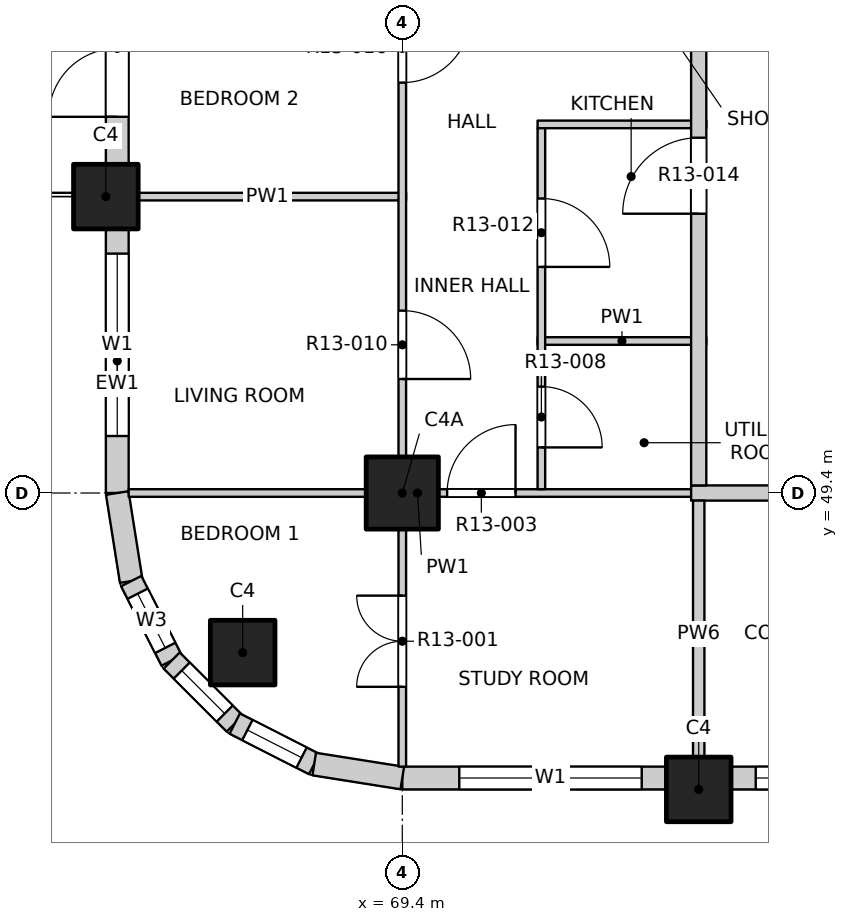
"""IFC4 building model, lengths in metres.
Left out: names, types, materials, properties, quantities, classifications, styles, units other than length and angle.
Written with IfcOpenShell. Run it as: python <this file> out.ifc"""

import sys

from ifc_helpers import new_model, si_unit, direction, frame, frame_2d, origin, origin_2d, place, context, subcontext, project, spatial, rectangle, extrude, element, fill, save


model = new_model("IFC4")
c1 = context("Model", 3, precision=1e-05, world=origin(), true_north=direction((0.0, 1.0)))
c2 = subcontext(c1, "Body", "Model", "MODEL_VIEW")
j1 = project(units=[si_unit("LENGTHUNIT", "METRE"), si_unit("PLANEANGLEUNIT", "RADIAN")], contexts=[c1])
p1 = place(None, origin())
s1 = spatial("IfcSite", under=j1, at=p1, CompositionType="ELEMENT")
p2 = place(p1, origin())
s2 = spatial("IfcBuilding", under=s1, at=p2, CompositionType="ELEMENT")
p3 = place(p2, frame((0.0, 0.0, 140.7)))
s3 = spatial("IfcBuildingStorey", under=s2, at=p3, CompositionType="ELEMENT", Elevation=140.7)
for number, where, z_axis, x_axis in (
    (1, (67.3, 47.3, -0.25), (0.0, 0.0, 1.0), (1.0, 0.0, 0.0)),
    (2, (65.5, 53.3, -0.25), (0.0, 0.0, 1.0), (1.0, 0.0, 0.0)),
    (3, (73.3, 45.5, -0.25), (0.0, 0.0, 1.0), (1.0, 0.0, 0.0)),
):
    element("IfcColumn", number, at=place(p3, frame(where, z_axis=z_axis, x_axis=x_axis)), inside=s3, PredefinedType="COLUMN", context=c2, shape_type="SweptSolid", body=[
        extrude(rectangle(XDim=0.85, YDim=0.85, at=origin_2d()), origin(), (0.0, 0.0, 1.0), 3.35),
    ])
p4 = place(p3, frame((69.4, 49.4, -0.25), z_axis=(0.0, 0.0, 1.0), x_axis=(1.0, 0.0, 0.0)))
e4 = element("IfcColumn", 4, at=p4, inside=s3, PredefinedType="COLUMN", context=c2, shape_type="SweptSolid", body=[
    extrude(rectangle(XDim=0.95, YDim=0.95, at=origin_2d()), origin(), (0.0, 0.0, 1.0), 3.35),
])
p5 = place(p3, frame((69.4, 45.65, 0.0), z_axis=(0.0, 0.0, 1.0), x_axis=(1.0, 0.0, 0.0)))
e5 = element("IfcWall", 5, at=p5, inside=s3, PredefinedType="SOLIDWALL", context=c2, shape_type="SweptSolid", body=[
    extrude(rectangle(XDim=3.475, YDim=0.3, at=frame_2d((1.738, 0.0))), origin(), (0.0, 0.0, 1.0), 3.1),
])
p6 = place(p5, frame((0.75, 0.0, 0.9)))
e6 = element("IfcOpeningElement", 6, at=p6, cuts=e5, PredefinedType="OPENING", context=c2, shape_type="SweptSolid", body=[
    extrude(rectangle(XDim=2.4, YDim=1.8, at=frame_2d((1.2, 0.9))), frame((0.0, 0.16, 0.0), z_axis=(0.0, -1.0, 0.0), x_axis=(1.0, 0.0, 0.0)), (0.0, 0.0, 1.0), 0.32),
])
p7 = place(p3, frame((73.725, 45.65, 0.0), z_axis=(0.0, 0.0, 1.0), x_axis=(1.0, 0.0, 0.0)))
e7 = element("IfcWall", 7, at=p7, inside=s3, PredefinedType="SOLIDWALL", context=c2, shape_type="SweptSolid", body=[
    extrude(rectangle(XDim=6.95, YDim=0.3, at=frame_2d((3.475, 0.0))), origin(), (0.0, 0.0, 1.0), 3.1),
])
p8 = place(p7, frame((0.325, 0.0, 0.9)))
e8 = element("IfcOpeningElement", 8, at=p8, cuts=e7, PredefinedType="OPENING", context=c2, shape_type="SweptSolid", body=[
    extrude(rectangle(XDim=2.4, YDim=1.8, at=frame_2d((1.2, 0.9))), frame((0.0, 0.16, 0.0), z_axis=(0.0, -1.0, 0.0), x_axis=(1.0, 0.0, 0.0)), (0.0, 0.0, 1.0), 0.32),
])
p9 = place(p7, frame((4.225, 0.0, 0.9)))
e9 = element("IfcOpeningElement", 9, at=p9, cuts=e7, PredefinedType="OPENING", context=c2, shape_type="SweptSolid", body=[
    extrude(rectangle(XDim=2.4, YDim=1.8, at=frame_2d((1.2, 0.9))), frame((0.0, 0.16, 0.0), z_axis=(0.0, -1.0, 0.0), x_axis=(1.0, 0.0, 0.0)), (0.0, 0.0, 1.0), 0.32),
])
p10 = place(p3, frame((65.65, 49.4, 0.0), z_axis=(0.0, 0.0, 1.0), x_axis=(0.0, 1.0, 0.0)))
e10 = element("IfcWall", 10, at=p10, inside=s3, PredefinedType="SOLIDWALL", context=c2, shape_type="SweptSolid", body=[
    extrude(rectangle(XDim=3.475, YDim=0.3, at=frame_2d((1.738, 0.0))), origin(), (0.0, 0.0, 1.0), 3.1),
])
p11 = place(p10, frame((0.75, 0.0, 0.9)))
e11 = element("IfcOpeningElement", 11, at=p11, cuts=e10, PredefinedType="OPENING", context=c2, shape_type="SweptSolid", body=[
    extrude(rectangle(XDim=2.4, YDim=1.8, at=frame_2d((1.2, 0.9))), frame((0.0, 0.16, 0.0), z_axis=(0.0, -1.0, 0.0), x_axis=(1.0, 0.0, 0.0)), (0.0, 0.0, 1.0), 0.32),
])
p12 = place(p3, frame((65.65, 53.725, 0.0), z_axis=(0.0, 0.0, 1.0), x_axis=(0.0, 1.0, 0.0)))
e12 = element("IfcWall", 12, at=p12, inside=s3, PredefinedType="SOLIDWALL", context=c2, shape_type="SweptSolid", body=[
    extrude(rectangle(XDim=6.95, YDim=0.3, at=frame_2d((3.475, 0.0))), origin(), (0.0, 0.0, 1.0), 3.1),
])
p13 = place(p12, frame((0.625, 0.0, 0.0)))
e13 = element("IfcOpeningElement", 13, at=p13, cuts=e12, PredefinedType="OPENING", context=c2, shape_type="SweptSolid", body=[
    extrude(rectangle(XDim=1.8, YDim=2.4, at=frame_2d((0.9, 1.2))), frame((0.0, 0.16, 0.0), z_axis=(0.0, -1.0, 0.0), x_axis=(1.0, 0.0, 0.0)), (0.0, 0.0, 1.0), 0.32),
])
p14 = place(p12, frame((4.225, 0.0, 0.9)))
e14 = element("IfcOpeningElement", 14, at=p14, cuts=e12, PredefinedType="OPENING", context=c2, shape_type="SweptSolid", body=[
    extrude(rectangle(XDim=2.4, YDim=1.8, at=frame_2d((1.2, 0.9))), frame((0.0, 0.16, 0.0), z_axis=(0.0, -1.0, 0.0), x_axis=(1.0, 0.0, 0.0)), (0.0, 0.0, 1.0), 0.32),
])
p15 = place(p3, frame((65.65, 49.4, 0.0), z_axis=(0.0, 0.0, 1.0), x_axis=(0.156496880861, -0.987678452879, 0.0)))
e15 = element("IfcWall", 15, at=p15, inside=s3, PredefinedType="SOLIDWALL", context=c2, shape_type="SweptSolid", body=[
    extrude(rectangle(XDim=1.173, YDim=0.3, at=frame_2d((0.586, 0.0))), origin(), (0.0, 0.0, 1.0), 3.1),
])
p16 = place(p3, frame((65.833, 48.241, 0.0), z_axis=(0.0, 0.0, 1.0), x_axis=(0.454025524128, -0.890988677504, 0.0)))
e16 = element("IfcWall", 16, at=p16, inside=s3, PredefinedType="SOLIDWALL", context=c2, shape_type="SweptSolid", body=[
    extrude(rectangle(XDim=1.173, YDim=0.3, at=frame_2d((0.587, 0.0))), origin(), (0.0, 0.0, 1.0), 3.1),
])
p17 = place(p16, frame((0.187, 0.0, 0.9)))
e17 = element("IfcOpeningElement", 17, at=p17, cuts=e16, PredefinedType="OPENING", context=c2, shape_type="SweptSolid", body=[
    extrude(rectangle(XDim=0.8, YDim=1.2, at=frame_2d((0.4, 0.6))), frame((0.0, 0.16, 0.0), z_axis=(0.0, -1.0, 0.0), x_axis=(1.0, 0.0, 0.0)), (0.0, 0.0, 1.0), 0.32),
])
p18 = place(p3, frame((66.366, 47.196, 0.0), z_axis=(0.0, 0.0, 1.0), x_axis=(0.707106781187, -0.707106781187, 0.0)))
e18 = element("IfcWall", 18, at=p18, inside=s3, PredefinedType="SOLIDWALL", context=c2, shape_type="SweptSolid", body=[
    extrude(rectangle(XDim=1.173, YDim=0.3, at=frame_2d((0.586, 0.0))), origin(), (0.0, 0.0, 1.0), 3.1),
])
p19 = place(p18, frame((0.187, 0.0, 0.9)))
e19 = element("IfcOpeningElement", 19, at=p19, cuts=e18, PredefinedType="OPENING", context=c2, shape_type="SweptSolid", body=[
    extrude(rectangle(XDim=0.8, YDim=1.2, at=frame_2d((0.4, 0.6))), frame((0.0, 0.16, 0.0), z_axis=(0.0, -1.0, 0.0), x_axis=(1.0, 0.0, 0.0)), (0.0, 0.0, 1.0), 0.32),
])
p20 = place(p3, frame((67.196, 46.366, 0.0), z_axis=(0.0, 0.0, 1.0), x_axis=(0.890988677504, -0.454025524128, 0.0)))
e20 = element("IfcWall", 20, at=p20, inside=s3, PredefinedType="SOLIDWALL", context=c2, shape_type="SweptSolid", body=[
    extrude(rectangle(XDim=1.173, YDim=0.3, at=frame_2d((0.587, 0.0))), origin(), (0.0, 0.0, 1.0), 3.1),
])
p21 = place(p20, frame((0.187, 0.0, 0.9)))
e21 = element("IfcOpeningElement", 21, at=p21, cuts=e20, PredefinedType="OPENING", context=c2, shape_type="SweptSolid", body=[
    extrude(rectangle(XDim=0.8, YDim=1.2, at=frame_2d((0.4, 0.6))), frame((0.0, 0.16, 0.0), z_axis=(0.0, -1.0, 0.0), x_axis=(1.0, 0.0, 0.0)), (0.0, 0.0, 1.0), 0.32),
])
p22 = place(p3, frame((68.241, 45.833, 0.0), z_axis=(0.0, 0.0, 1.0), x_axis=(0.987678452879, -0.156496880861, 0.0)))
e22 = element("IfcWall", 22, at=p22, inside=s3, PredefinedType="SOLIDWALL", context=c2, shape_type="SweptSolid", body=[
    extrude(rectangle(XDim=1.173, YDim=0.3, at=frame_2d((0.586, 0.0))), origin(), (0.0, 0.0, 1.0), 3.1),
])
p23 = place(p3, frame((65.8, 49.4, 0.0), z_axis=(0.0, 0.0, 1.0), x_axis=(1.0, 0.0, 0.0)))
e23 = element("IfcWall", 23, at=p23, inside=s3, PredefinedType="PARTITIONING", context=c2, shape_type="SweptSolid", body=[
    extrude(rectangle(XDim=7.6, YDim=0.1, at=frame_2d((3.8, 0.0))), origin(), (0.0, 0.0, 1.0), 3.1),
])
p24 = place(p23, frame((4.19, 0.0, 0.0)))
e24 = element("IfcOpeningElement", 24, at=p24, cuts=e23, PredefinedType="OPENING", context=c2, shape_type="SweptSolid", body=[
    extrude(rectangle(XDim=0.9, YDim=2.1, at=frame_2d((0.45, 1.05))), frame((0.0, 0.06, 0.0), z_axis=(0.0, -1.0, 0.0), x_axis=(1.0, 0.0, 0.0)), (0.0, 0.0, 1.0), 0.12),
])
p25 = place(p3, frame((73.2, 49.4, 0.0), z_axis=(0.0, 0.0, 1.0), x_axis=(1.0, 0.0, 0.0)))
e25 = element("IfcWall", 25, at=p25, inside=s3, PredefinedType="PARTITIONING", context=c2, shape_type="SweptSolid", body=[
    extrude(rectangle(XDim=23.6, YDim=0.2, at=frame_2d((11.8, 0.0))), origin(), (0.0, 0.0, 1.0), 3.1),
])
p26 = place(p25, frame((2.225, 0.0, 0.0)))
e26 = element("IfcOpeningElement", 26, at=p26, cuts=e25, PredefinedType="OPENING", context=c2, shape_type="SweptSolid", body=[
    extrude(rectangle(XDim=1.2, YDim=2.1, at=frame_2d((0.6, 1.05))), frame((0.0, 0.11, 0.0), z_axis=(0.0, -1.0, 0.0), x_axis=(1.0, 0.0, 0.0)), (0.0, 0.0, 1.0), 0.22),
])
p27 = place(p25, frame((12.375, 0.0, 0.0)))
e27 = element("IfcOpeningElement", 27, at=p27, cuts=e25, PredefinedType="OPENING", context=c2, shape_type="SweptSolid", body=[
    extrude(rectangle(XDim=1.2, YDim=2.1, at=frame_2d((0.6, 1.05))), frame((0.0, 0.11, 0.0), z_axis=(0.0, -1.0, 0.0), x_axis=(1.0, 0.0, 0.0)), (0.0, 0.0, 1.0), 0.22),
])
p28 = place(p25, frame((20.175, 0.0, 0.0)))
e28 = element("IfcOpeningElement", 28, at=p28, cuts=e25, PredefinedType="OPENING", context=c2, shape_type="SweptSolid", body=[
    extrude(rectangle(XDim=1.2, YDim=2.1, at=frame_2d((0.6, 1.05))), frame((0.0, 0.11, 0.0), z_axis=(0.0, -1.0, 0.0), x_axis=(1.0, 0.0, 0.0)), (0.0, 0.0, 1.0), 0.22),
])
p29 = place(p3, frame((71.18, 51.4, 0.0), z_axis=(0.0, 0.0, 1.0), x_axis=(1.0, 0.0, 0.0)))
e29 = element("IfcWall", 29, at=p29, inside=s3, PredefinedType="PARTITIONING", context=c2, shape_type="SweptSolid", body=[
    extrude(rectangle(XDim=2.22, YDim=0.1, at=frame_2d((1.11, 0.0))), origin(), (0.0, 0.0, 1.0), 3.1),
])
p30 = place(p3, frame((65.8, 53.3, 0.0), z_axis=(0.0, 0.0, 1.0), x_axis=(1.0, 0.0, 0.0)))
e30 = element("IfcWall", 30, at=p30, inside=s3, PredefinedType="PARTITIONING", context=c2, shape_type="SweptSolid", body=[
    extrude(rectangle(XDim=3.65, YDim=0.1, at=frame_2d((1.825, 0.0))), origin(), (0.0, 0.0, 1.0), 3.1),
])
p31 = place(p3, frame((71.18, 54.25, 0.0), z_axis=(0.0, 0.0, 1.0), x_axis=(1.0, 0.0, 0.0)))
e31 = element("IfcWall", 31, at=p31, inside=s3, PredefinedType="PARTITIONING", context=c2, shape_type="SweptSolid", body=[
    extrude(rectangle(XDim=2.22, YDim=0.1, at=frame_2d((1.11, 0.0))), origin(), (0.0, 0.0, 1.0), 3.1),
])
p32 = place(p3, frame((69.4, 45.8, 0.0), z_axis=(0.0, 0.0, 1.0), x_axis=(0.0, 1.0, 0.0)))
e32 = element("IfcWall", 32, at=p32, inside=s3, PredefinedType="PARTITIONING", context=c2, shape_type="SweptSolid", body=[
    extrude(rectangle(XDim=38.4, YDim=0.1, at=frame_2d((19.2, 0.0))), origin(), (0.0, 0.0, 1.0), 3.1),
])
p33 = place(p32, frame((1.05, 0.0, 0.0)))
e33 = element("IfcOpeningElement", 33, at=p33, cuts=e32, PredefinedType="OPENING", context=c2, shape_type="SweptSolid", body=[
    extrude(rectangle(XDim=1.2, YDim=2.1, at=frame_2d((0.6, 1.05))), frame((0.0, 0.06, 0.0), z_axis=(0.0, -1.0, 0.0), x_axis=(1.0, 0.0, 0.0)), (0.0, 0.0, 1.0), 0.12),
])
p34 = place(p32, frame((5.1, 0.0, 0.0)))
e34 = element("IfcOpeningElement", 34, at=p34, cuts=e32, PredefinedType="OPENING", context=c2, shape_type="SweptSolid", body=[
    extrude(rectangle(XDim=0.9, YDim=2.1, at=frame_2d((0.45, 1.05))), frame((0.0, 0.06, 0.0), z_axis=(0.0, -1.0, 0.0), x_axis=(1.0, 0.0, 0.0)), (0.0, 0.0, 1.0), 0.12),
])
p35 = place(p32, frame((9.0, 0.0, 0.0)))
e35 = element("IfcOpeningElement", 35, at=p35, cuts=e32, PredefinedType="OPENING", context=c2, shape_type="SweptSolid", body=[
    extrude(rectangle(XDim=0.9, YDim=2.1, at=frame_2d((0.45, 1.05))), frame((0.0, 0.06, 0.0), z_axis=(0.0, -1.0, 0.0), x_axis=(1.0, 0.0, 0.0)), (0.0, 0.0, 1.0), 0.12),
])
p36 = place(p32, frame((12.9, 0.0, 0.0)))
e36 = element("IfcOpeningElement", 36, at=p36, cuts=e32, PredefinedType="OPENING", context=c2, shape_type="SweptSolid", body=[
    extrude(rectangle(XDim=0.9, YDim=2.1, at=frame_2d((0.45, 1.05))), frame((0.0, 0.06, 0.0), z_axis=(0.0, -1.0, 0.0), x_axis=(1.0, 0.0, 0.0)), (0.0, 0.0, 1.0), 0.12),
])
p37 = place(p32, frame((16.8, 0.0, 0.0)))
e37 = element("IfcOpeningElement", 37, at=p37, cuts=e32, PredefinedType="OPENING", context=c2, shape_type="SweptSolid", body=[
    extrude(rectangle(XDim=0.9, YDim=2.1, at=frame_2d((0.45, 1.05))), frame((0.0, 0.06, 0.0), z_axis=(0.0, -1.0, 0.0), x_axis=(1.0, 0.0, 0.0)), (0.0, 0.0, 1.0), 0.12),
])
p38 = place(p32, frame((20.7, 0.0, 0.0)))
e38 = element("IfcOpeningElement", 38, at=p38, cuts=e32, PredefinedType="OPENING", context=c2, shape_type="SweptSolid", body=[
    extrude(rectangle(XDim=0.9, YDim=2.1, at=frame_2d((0.45, 1.05))), frame((0.0, 0.06, 0.0), z_axis=(0.0, -1.0, 0.0), x_axis=(1.0, 0.0, 0.0)), (0.0, 0.0, 1.0), 0.12),
])
p39 = place(p32, frame((24.6, 0.0, 0.0)))
e39 = element("IfcOpeningElement", 39, at=p39, cuts=e32, PredefinedType="OPENING", context=c2, shape_type="SweptSolid", body=[
    extrude(rectangle(XDim=0.9, YDim=2.1, at=frame_2d((0.45, 1.05))), frame((0.0, 0.06, 0.0), z_axis=(0.0, -1.0, 0.0), x_axis=(1.0, 0.0, 0.0)), (0.0, 0.0, 1.0), 0.12),
])
p40 = place(p32, frame((30.3, 0.0, 0.0)))
e40 = element("IfcOpeningElement", 40, at=p40, cuts=e32, PredefinedType="OPENING", context=c2, shape_type="SweptSolid", body=[
    extrude(rectangle(XDim=1.2, YDim=2.1, at=frame_2d((0.6, 1.05))), frame((0.0, 0.06, 0.0), z_axis=(0.0, -1.0, 0.0), x_axis=(1.0, 0.0, 0.0)), (0.0, 0.0, 1.0), 0.12),
])
p41 = place(p32, frame((36.15, 0.0, 0.0)))
e41 = element("IfcOpeningElement", 41, at=p41, cuts=e32, PredefinedType="OPENING", context=c2, shape_type="SweptSolid", body=[
    extrude(rectangle(XDim=1.2, YDim=2.1, at=frame_2d((0.6, 1.05))), frame((0.0, 0.06, 0.0), z_axis=(0.0, -1.0, 0.0), x_axis=(1.0, 0.0, 0.0)), (0.0, 0.0, 1.0), 0.12),
])
p42 = place(p3, frame((71.23, 49.45, 0.0), z_axis=(0.0, 0.0, 1.0), x_axis=(0.0, 1.0, 0.0)))
e42 = element("IfcWall", 42, at=p42, inside=s3, PredefinedType="PARTITIONING", context=c2, shape_type="SweptSolid", body=[
    extrude(rectangle(XDim=4.75, YDim=0.1, at=frame_2d((2.375, 0.0))), origin(), (0.0, 0.0, 1.0), 3.1),
])
p43 = place(p42, frame((0.55, 0.0, 0.0)))
e43 = element("IfcOpeningElement", 43, at=p43, cuts=e42, PredefinedType="OPENING", context=c2, shape_type="SweptSolid", body=[
    extrude(rectangle(XDim=0.8, YDim=2.1, at=frame_2d((0.4, 1.05))), frame((0.0, 0.06, 0.0), z_axis=(0.0, -1.0, 0.0), x_axis=(1.0, 0.0, 0.0)), (0.0, 0.0, 1.0), 0.12),
])
p44 = place(p42, frame((2.925, 0.0, 0.0)))
e44 = element("IfcOpeningElement", 44, at=p44, cuts=e42, PredefinedType="OPENING", context=c2, shape_type="SweptSolid", body=[
    extrude(rectangle(XDim=0.9, YDim=2.1, at=frame_2d((0.45, 1.05))), frame((0.0, 0.06, 0.0), z_axis=(0.0, -1.0, 0.0), x_axis=(1.0, 0.0, 0.0)), (0.0, 0.0, 1.0), 0.12),
])
p45 = place(p3, frame((73.3, 45.8, 0.0), z_axis=(0.0, 0.0, 1.0), x_axis=(0.0, 1.0, 0.0)))
e45 = element("IfcWall", 45, at=p45, inside=s3, PredefinedType="PARTITIONING", context=c2, shape_type="SweptSolid", body=[
    extrude(rectangle(XDim=3.5, YDim=0.15, at=frame_2d((1.75, 0.0))), origin(), (0.0, 0.0, 1.0), 3.1),
])
p46 = place(p3, frame((73.3, 49.5, 0.0), z_axis=(0.0, 0.0, 1.0), x_axis=(0.0, 1.0, 0.0)))
e46 = element("IfcWall", 46, at=p46, inside=s3, PredefinedType="PARTITIONING", context=c2, shape_type="SweptSolid", body=[
    extrude(rectangle(XDim=34.7, YDim=0.2, at=frame_2d((17.35, 0.0))), origin(), (0.0, 0.0, 1.0), 3.1),
])
p47 = place(p46, frame((3.575, 0.0, 0.0)))
e47 = element("IfcOpeningElement", 47, at=p47, cuts=e46, PredefinedType="OPENING", context=c2, shape_type="SweptSolid", body=[
    extrude(rectangle(XDim=1.0, YDim=2.1, at=frame_2d((0.5, 1.05))), frame((0.0, 0.11, 0.0), z_axis=(0.0, -1.0, 0.0), x_axis=(1.0, 0.0, 0.0)), (0.0, 0.0, 1.0), 0.22),
])
p48 = place(p46, frame((21.975, 0.0, 0.0)))
e48 = element("IfcOpeningElement", 48, at=p48, cuts=e46, PredefinedType="OPENING", context=c2, shape_type="SweptSolid", body=[
    extrude(rectangle(XDim=1.0, YDim=2.1, at=frame_2d((0.5, 1.05))), frame((0.0, 0.11, 0.0), z_axis=(0.0, -1.0, 0.0), x_axis=(1.0, 0.0, 0.0)), (0.0, 0.0, 1.0), 0.22),
])
p49 = place(p46, frame((29.125, 0.0, 0.0)))
e49 = element("IfcOpeningElement", 49, at=p49, cuts=e46, PredefinedType="OPENING", context=c2, shape_type="SweptSolid", body=[
    extrude(rectangle(XDim=1.0, YDim=2.1, at=frame_2d((0.5, 1.05))), frame((0.0, 0.11, 0.0), z_axis=(0.0, -1.0, 0.0), x_axis=(1.0, 0.0, 0.0)), (0.0, 0.0, 1.0), 0.22),
])
p50 = place(p6, origin())
e50 = element("IfcWindow", 50, at=p50, inside=s3, PartitioningType="DOUBLE_PANEL_VERTICAL", PredefinedType="WINDOW", context=c2, shape_type="SweptSolid", body=[
    extrude(rectangle(XDim=2.4, YDim=1.8, at=frame_2d((1.2, 0.9))), frame((0.0, 0.03, 0.0), z_axis=(0.0, -1.0, 0.0), x_axis=(1.0, 0.0, 0.0)), (0.0, 0.0, 1.0), 0.06),
])
fill(e6, e50)
p51 = place(p8, origin())
e51 = element("IfcWindow", 51, at=p51, inside=s3, PartitioningType="DOUBLE_PANEL_VERTICAL", PredefinedType="WINDOW", context=c2, shape_type="SweptSolid", body=[
    extrude(rectangle(XDim=2.4, YDim=1.8, at=frame_2d((1.2, 0.9))), frame((0.0, 0.03, 0.0), z_axis=(0.0, -1.0, 0.0), x_axis=(1.0, 0.0, 0.0)), (0.0, 0.0, 1.0), 0.06),
])
fill(e8, e51)
p52 = place(p11, origin())
e52 = element("IfcWindow", 52, at=p52, inside=s3, PartitioningType="DOUBLE_PANEL_VERTICAL", PredefinedType="WINDOW", context=c2, shape_type="SweptSolid", body=[
    extrude(rectangle(XDim=2.4, YDim=1.8, at=frame_2d((1.2, 0.9))), frame((0.0, 0.03, 0.0), z_axis=(0.0, -1.0, 0.0), x_axis=(1.0, 0.0, 0.0)), (0.0, 0.0, 1.0), 0.06),
])
fill(e11, e52)
p53 = place(p13, origin())
e53 = element("IfcDoor", 53, at=p53, inside=s3, OperationType="DOUBLE_DOOR_SINGLE_SWING", PredefinedType="DOOR", context=c2, shape_type="SweptSolid", body=[
    extrude(rectangle(XDim=1.8, YDim=2.4, at=frame_2d((0.9, 1.2))), frame((0.0, 0.025, 0.0), z_axis=(0.0, -1.0, 0.0), x_axis=(1.0, 0.0, 0.0)), (0.0, 0.0, 1.0), 0.05),
])
fill(e13, e53)
p54 = place(p17, origin())
e54 = element("IfcWindow", 54, at=p54, inside=s3, PartitioningType="SINGLE_PANEL", PredefinedType="WINDOW", context=c2, shape_type="SweptSolid", body=[
    extrude(rectangle(XDim=0.8, YDim=1.2, at=frame_2d((0.4, 0.6))), frame((0.0, 0.03, 0.0), z_axis=(0.0, -1.0, 0.0), x_axis=(1.0, 0.0, 0.0)), (0.0, 0.0, 1.0), 0.06),
])
fill(e17, e54)
p55 = place(p19, origin())
e55 = element("IfcWindow", 55, at=p55, inside=s3, PartitioningType="SINGLE_PANEL", PredefinedType="WINDOW", context=c2, shape_type="SweptSolid", body=[
    extrude(rectangle(XDim=0.8, YDim=1.2, at=frame_2d((0.4, 0.6))), frame((0.0, 0.03, 0.0), z_axis=(0.0, -1.0, 0.0), x_axis=(1.0, 0.0, 0.0)), (0.0, 0.0, 1.0), 0.06),
])
fill(e19, e55)
p56 = place(p21, origin())
e56 = element("IfcWindow", 56, at=p56, inside=s3, PartitioningType="SINGLE_PANEL", PredefinedType="WINDOW", context=c2, shape_type="SweptSolid", body=[
    extrude(rectangle(XDim=0.8, YDim=1.2, at=frame_2d((0.4, 0.6))), frame((0.0, 0.03, 0.0), z_axis=(0.0, -1.0, 0.0), x_axis=(1.0, 0.0, 0.0)), (0.0, 0.0, 1.0), 0.06),
])
fill(e21, e56)
p57 = place(p33, origin())
e57 = element("IfcDoor", 57, at=p57, inside=s3, OperationType="DOUBLE_DOOR_SINGLE_SWING", PredefinedType="DOOR", context=c2, shape_type="SweptSolid", body=[
    extrude(rectangle(XDim=1.2, YDim=2.1, at=frame_2d((0.6, 1.05))), frame((0.0, 0.025, 0.0), z_axis=(0.0, -1.0, 0.0), x_axis=(1.0, 0.0, 0.0)), (0.0, 0.0, 1.0), 0.05),
])
fill(e33, e57)
p58 = place(p24, origin())
e58 = element("IfcDoor", 58, at=p58, inside=s3, OperationType="SINGLE_SWING_RIGHT", PredefinedType="DOOR", context=c2, shape_type="SweptSolid", body=[
    extrude(rectangle(XDim=0.9, YDim=2.1, at=frame_2d((0.45, 1.05))), frame((0.0, 0.025, 0.0), z_axis=(0.0, -1.0, 0.0), x_axis=(1.0, 0.0, 0.0)), (0.0, 0.0, 1.0), 0.05),
])
fill(e24, e58)
p59 = place(p43, origin())
e59 = element("IfcDoor", 59, at=p59, inside=s3, OperationType="SINGLE_SWING_RIGHT", PredefinedType="DOOR", context=c2, shape_type="SweptSolid", body=[
    extrude(rectangle(XDim=0.8, YDim=2.1, at=frame_2d((0.4, 1.05))), frame((0.0, 0.025, 0.0), z_axis=(0.0, -1.0, 0.0), x_axis=(1.0, 0.0, 0.0)), (0.0, 0.0, 1.0), 0.05),
])
fill(e43, e59)
p60 = place(p34, origin())
e60 = element("IfcDoor", 60, at=p60, inside=s3, OperationType="SINGLE_SWING_RIGHT", PredefinedType="DOOR", context=c2, shape_type="SweptSolid", body=[
    extrude(rectangle(XDim=0.9, YDim=2.1, at=frame_2d((0.45, 1.05))), frame((0.0, 0.025, 0.0), z_axis=(0.0, -1.0, 0.0), x_axis=(1.0, 0.0, 0.0)), (0.0, 0.0, 1.0), 0.05),
])
fill(e34, e60)
p61 = place(p44, origin())
e61 = element("IfcDoor", 61, at=p61, inside=s3, OperationType="SINGLE_SWING_RIGHT", PredefinedType="DOOR", context=c2, shape_type="SweptSolid", body=[
    extrude(rectangle(XDim=0.9, YDim=2.1, at=frame_2d((0.45, 1.05))), frame((0.0, 0.025, 0.0), z_axis=(0.0, -1.0, 0.0), x_axis=(1.0, 0.0, 0.0)), (0.0, 0.0, 1.0), 0.05),
])
fill(e44, e61)
p62 = place(p47, origin())
e62 = element("IfcDoor", 62, at=p62, inside=s3, OperationType="SINGLE_SWING_LEFT", PredefinedType="DOOR", context=c2, shape_type="SweptSolid", body=[
    extrude(rectangle(XDim=1.0, YDim=2.1, at=frame_2d((0.5, 1.05))), frame((0.0, 0.025, 0.0), z_axis=(0.0, -1.0, 0.0), x_axis=(1.0, 0.0, 0.0)), (0.0, 0.0, 1.0), 0.05),
])
fill(e47, e62)
p63 = place(p35, origin())
e63 = element("IfcDoor", 63, at=p63, inside=s3, OperationType="SINGLE_SWING_LEFT", PredefinedType="DOOR", context=c2, shape_type="SweptSolid", body=[
    extrude(rectangle(XDim=0.9, YDim=2.1, at=frame_2d((0.45, 1.05))), frame((0.0, 0.025, 0.0), z_axis=(0.0, -1.0, 0.0), x_axis=(1.0, 0.0, 0.0)), (0.0, 0.0, 1.0), 0.05),
])
fill(e35, e63)
save(model, sys.argv[1])
